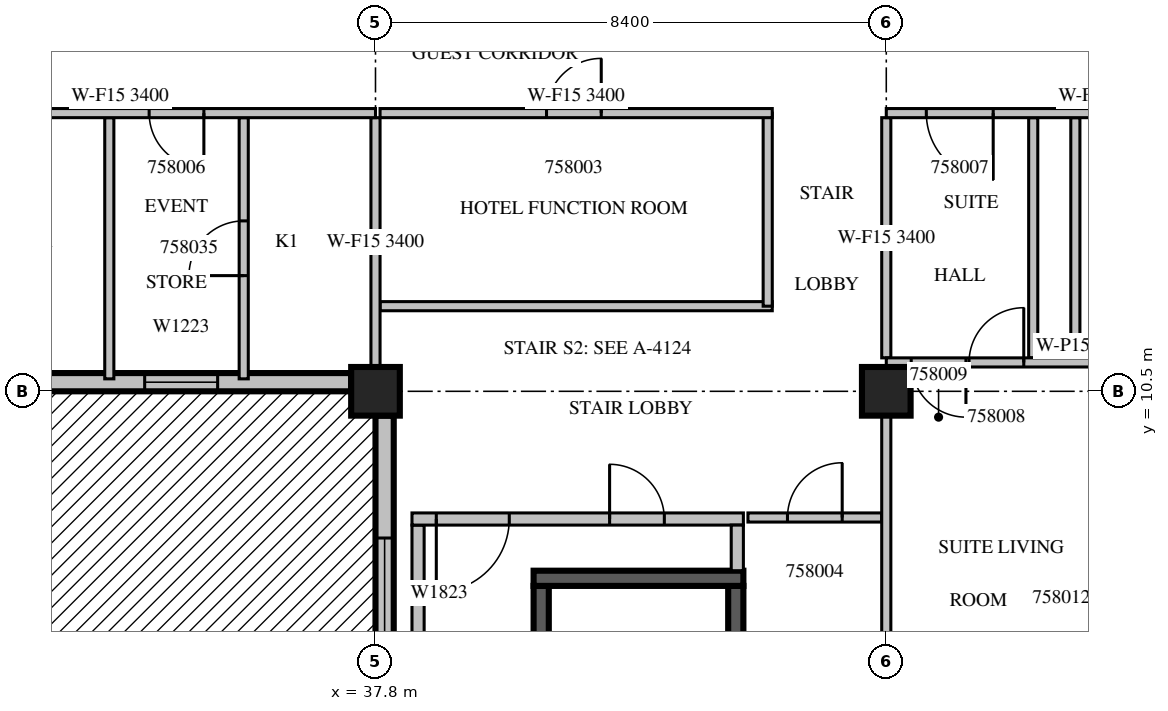
"""IFC4 building model, lengths in metres.
Left out: names, types, materials, properties, quantities, classifications, styles, units other than length and angle.
Written with IfcOpenShell. Run it as: python <this file> out.ifc"""

import sys

from ifc_helpers import new_model, si_unit, direction, frame, frame_2d, origin, origin_2d, place, context, subcontext, project, spatial, rectangle, extrude, source, transform, mapped, element, fill, save


model = new_model("IFC4")
c1 = context("Model", 3, precision=1e-05, world=origin(), true_north=direction((0.0, 1.0)))
c2 = subcontext(c1, "Body", "Model", "MODEL_VIEW")
j1 = project(units=[si_unit("LENGTHUNIT", "METRE"), si_unit("PLANEANGLEUNIT", "RADIAN")], contexts=[c1])
p1 = place(None, origin())
s1 = spatial("IfcSite", under=j1, at=p1, CompositionType="ELEMENT")
p2 = place(p1, origin())
s2 = spatial("IfcBuilding", under=s1, at=p2, CompositionType="ELEMENT")
p3 = place(p2, frame((0.0, 0.0, 253.8)))
s3 = spatial("IfcBuildingStorey", under=s2, at=p3, CompositionType="ELEMENT", Elevation=253.8)
m1 = source(origin(), c2, "Body", "SweptSolid", [
    extrude(rectangle(XDim=0.8, YDim=0.8, at=origin_2d()), origin(), (0.0, 0.0, 1.0), 3.8),
])
for number, where, z_axis, x_axis in (
    (1, (37.8, 10.5, 0.0), (0.0, 0.0, 1.0), (1.0, 0.0, 0.0)),
    (2, (46.2, 10.5, 0.0), (0.0, 0.0, 1.0), (1.0, 0.0, 0.0)),
):
    element("IfcColumn", number, at=place(p3, frame(where, z_axis=z_axis, x_axis=x_axis)), inside=s3, PredefinedType="COLUMN", context=c2, shape_type="MappedRepresentation", body=[
        mapped(m1, transform((0.0, 0.0, 0.0), scale=1.0)),
    ])
m2 = source(origin(), c2, "Body", "SweptSolid", [
    extrude(rectangle(XDim=7.6, YDim=0.3, at=frame_2d((3.8, 0.0))), origin(), (0.0, 0.0, 1.0), 3.4),
])
p4 = place(p3, frame((29.8, 10.65, 0.0), z_axis=(0.0, 0.0, 1.0), x_axis=(1.0, 0.0, 0.0)))
e3 = element("IfcWall", 3, at=p4, inside=s3, PredefinedType="STANDARD", context=c2, shape_type="MappedRepresentation", body=[
    mapped(m2, transform((0.0, 0.0, 0.0), scale=1.0)),
])
m3 = source(origin(), c2, "Body", "SweptSolid", [
    extrude(rectangle(XDim=1.8, YDim=2.4, at=frame_2d((0.9, 1.2))), frame((0.0, 0.16, 0.0), z_axis=(0.0, -1.0, 0.0), x_axis=(1.0, 0.0, 0.0)), (0.0, 0.0, 1.0), 0.32),
])
p5 = place(p4, frame((0.8, 0.0, 0.0)))
e4 = element("IfcOpeningElement", 4, at=p5, cuts=e3, PredefinedType="OPENING", context=c2, shape_type="MappedRepresentation", body=[
    mapped(m3, transform((0.0, 0.0, 0.0), scale=1.0)),
])
m4 = source(origin(), c2, "Body", "SweptSolid", [
    extrude(rectangle(XDim=1.2, YDim=2.3, at=frame_2d((0.6, 1.15))), frame((0.0, 0.16, 0.0), z_axis=(0.0, -1.0, 0.0), x_axis=(1.0, 0.0, 0.0)), (0.0, 0.0, 1.0), 0.32),
])
p6 = place(p4, frame((4.204, 0.0, 0.6)))
e5 = element("IfcOpeningElement", 5, at=p6, cuts=e3, PredefinedType="OPENING", context=c2, shape_type="MappedRepresentation", body=[
    mapped(m4, transform((0.0, 0.0, 0.0), scale=1.0)),
])
m5 = source(origin(), c2, "Body", "SweptSolid", [
    extrude(rectangle(XDim=9.3, YDim=0.3, at=frame_2d((4.65, 0.0))), origin(), (0.0, 0.0, 1.0), 3.4),
])
p7 = place(p3, frame((37.95, 10.1, 0.0), z_axis=(0.0, 0.0, 1.0), x_axis=(0.0, -1.0, 0.0)))
e6 = element("IfcWall", 6, at=p7, inside=s3, PredefinedType="STANDARD", context=c2, shape_type="MappedRepresentation", body=[
    mapped(m5, transform((0.0, 0.0, 0.0), scale=1.0)),
])
m6 = source(origin(), c2, "Body", "SweptSolid", [
    extrude(rectangle(XDim=1.8, YDim=2.3, at=frame_2d((0.9, 1.15))), frame((0.0, 0.16, 0.0), z_axis=(0.0, -1.0, 0.0), x_axis=(1.0, 0.0, 0.0)), (0.0, 0.0, 1.0), 0.32),
])
p8 = place(p7, frame((2.013, 0.0, 0.6)))
e7 = element("IfcOpeningElement", 7, at=p8, cuts=e6, PredefinedType="OPENING", context=c2, shape_type="MappedRepresentation", body=[
    mapped(m6, transform((0.0, 0.0, 0.0), scale=1.0)),
])
m7 = source(origin(), c2, "Body", "SweptSolid", [
    extrude(rectangle(XDim=3.0, YDim=2.3, at=frame_2d((1.5, 1.15))), frame((0.0, 0.16, 0.0), z_axis=(0.0, -1.0, 0.0), x_axis=(1.0, 0.0, 0.0)), (0.0, 0.0, 1.0), 0.32),
])
p9 = place(p7, frame((5.975, 0.0, 0.6)))
e8 = element("IfcOpeningElement", 8, at=p9, cuts=e6, PredefinedType="OPENING", context=c2, shape_type="MappedRepresentation", body=[
    mapped(m7, transform((0.0, 0.0, 0.0), scale=1.0)),
])
m8 = source(origin(), c2, "Body", "SweptSolid", [
    extrude(rectangle(XDim=7.0, YDim=0.25, at=frame_2d((3.5, 0.0))), origin(), (0.0, 0.0, 1.0), 3.4),
])
p10 = place(p3, frame((40.525, 0.3, 0.0), z_axis=(0.0, 0.0, 1.0), x_axis=(0.0, 1.0, 0.0)))
e9 = element("IfcWall", 9, at=p10, inside=s3, PredefinedType="SOLIDWALL", context=c2, shape_type="MappedRepresentation", body=[
    mapped(m8, transform((0.0, 0.0, 0.0), scale=1.0)),
])
m9 = source(origin(), c2, "Body", "SweptSolid", [
    extrude(rectangle(XDim=1.1, YDim=2.1, at=frame_2d((0.55, 1.05))), frame((0.0, 0.135, 0.0), z_axis=(0.0, -1.0, 0.0), x_axis=(1.0, 0.0, 0.0)), (0.0, 0.0, 1.0), 0.27),
])
p11 = place(p10, frame((0.55, 0.0, 0.0)))
e10 = element("IfcOpeningElement", 10, at=p11, cuts=e9, PredefinedType="OPENING", context=c2, shape_type="MappedRepresentation", body=[
    mapped(m9, transform((0.0, 0.0, 0.0), scale=1.0)),
])
p12 = place(p3, frame((43.725, 0.3, 0.0), z_axis=(0.0, 0.0, 1.0), x_axis=(0.0, 1.0, 0.0)))
e11 = element("IfcWall", 11, at=p12, inside=s3, PredefinedType="SOLIDWALL", context=c2, shape_type="MappedRepresentation", body=[
    mapped(m8, transform((0.0, 0.0, 0.0), scale=1.0)),
])
m10 = source(origin(), c2, "Body", "SweptSolid", [
    extrude(rectangle(XDim=3.45, YDim=0.25, at=frame_2d((1.725, 0.0))), origin(), (0.0, 0.0, 1.0), 3.4),
])
p13 = place(p3, frame((40.4, 7.425, 0.0), z_axis=(0.0, 0.0, 1.0), x_axis=(1.0, 0.0, 0.0)))
e12 = element("IfcWall", 12, at=p13, inside=s3, PredefinedType="SOLIDWALL", context=c2, shape_type="MappedRepresentation", body=[
    mapped(m10, transform((0.0, 0.0, 0.0), scale=1.0)),
])
m11 = source(origin(), c2, "Body", "SweptSolid", [
    extrude(rectangle(XDim=8.0, YDim=0.2, at=frame_2d((4.0, 0.0))), origin(), (0.0, 0.0, 1.0), 3.4),
])
p14 = place(p3, frame((38.5, 0.3, 0.0), z_axis=(0.0, 0.0, 1.0), x_axis=(0.0, 1.0, 0.0)))
e13 = element("IfcWall", 13, at=p14, inside=s3, PredefinedType="PARTITIONING", context=c2, shape_type="MappedRepresentation", body=[
    mapped(m11, transform((0.0, 0.0, 0.0), scale=1.0)),
])
m12 = source(origin(), c2, "Body", "SweptSolid", [
    extrude(rectangle(XDim=5.45, YDim=0.2, at=frame_2d((2.725, 0.0))), origin(), (0.0, 0.0, 1.0), 3.4),
])
p15 = place(p3, frame((38.4, 8.4, 0.0), z_axis=(0.0, 0.0, 1.0), x_axis=(1.0, 0.0, 0.0)))
e14 = element("IfcWall", 14, at=p15, inside=s3, PredefinedType="PARTITIONING", context=c2, shape_type="MappedRepresentation", body=[
    mapped(m12, transform((0.0, 0.0, 0.0), scale=1.0)),
])
m13 = source(origin(), c2, "Body", "SweptSolid", [
    extrude(rectangle(XDim=1.2, YDim=2.1, at=frame_2d((0.6, 1.05))), frame((0.0, 0.11, 0.0), z_axis=(0.0, -1.0, 0.0), x_axis=(1.0, 0.0, 0.0)), (0.0, 0.0, 1.0), 0.22),
])
p16 = place(p15, frame((0.4, 0.0, 0.0)))
e15 = element("IfcOpeningElement", 15, at=p16, cuts=e14, PredefinedType="OPENING", context=c2, shape_type="MappedRepresentation", body=[
    mapped(m13, transform((0.0, 0.0, 0.0), scale=1.0)),
])
m14 = source(origin(), c2, "Body", "SweptSolid", [
    extrude(rectangle(XDim=0.9, YDim=2.1, at=frame_2d((0.45, 1.05))), frame((0.0, 0.11, 0.0), z_axis=(0.0, -1.0, 0.0), x_axis=(1.0, 0.0, 0.0)), (0.0, 0.0, 1.0), 0.22),
])
p17 = place(p15, frame((3.25, 0.0, 0.0)))
e16 = element("IfcOpeningElement", 16, at=p17, cuts=e14, PredefinedType="OPENING", context=c2, shape_type="MappedRepresentation", body=[
    mapped(m14, transform((0.0, 0.0, 0.0), scale=1.0)),
])
m15 = source(origin(), c2, "Body", "SweptSolid", [
    extrude(rectangle(XDim=0.75, YDim=0.2, at=frame_2d((0.375, 0.0))), origin(), (0.0, 0.0, 1.0), 3.4),
])
p18 = place(p3, frame((43.75, 7.55, 0.0), z_axis=(0.0, 0.0, 1.0), x_axis=(0.0, 1.0, 0.0)))
e17 = element("IfcWall", 17, at=p18, inside=s3, PredefinedType="PARTITIONING", context=c2, shape_type="MappedRepresentation", body=[
    mapped(m15, transform((0.0, 0.0, 0.0), scale=1.0)),
])
m16 = source(origin(), c2, "Body", "SweptSolid", [
    extrude(rectangle(XDim=6.45, YDim=0.15, at=frame_2d((3.225, 0.0))), origin(), (0.0, 0.0, 1.0), 3.4),
])
p19 = place(p3, frame((37.875, 11.9, 0.0), z_axis=(0.0, 0.0, 1.0), x_axis=(1.0, 0.0, 0.0)))
e18 = element("IfcWall", 18, at=p19, inside=s3, PredefinedType="PARTITIONING", context=c2, shape_type="MappedRepresentation", body=[
    mapped(m16, transform((0.0, 0.0, 0.0), scale=1.0)),
])
m17 = source(origin(), c2, "Body", "SweptSolid", [
    extrude(rectangle(XDim=3.175, YDim=0.15, at=frame_2d((1.587, 0.0))), origin(), (0.0, 0.0, 1.0), 3.4),
])
p20 = place(p3, frame((44.25, 11.9, 0.0), z_axis=(0.0, 0.0, 1.0), x_axis=(0.0, 1.0, 0.0)))
e19 = element("IfcWall", 19, at=p20, inside=s3, PredefinedType="PARTITIONING", context=c2, shape_type="MappedRepresentation", body=[
    mapped(m17, transform((0.0, 0.0, 0.0), scale=1.0)),
])
p21 = place(p3, frame((44.325, 15.075, 0.0), z_axis=(0.0, 0.0, 1.0), x_axis=(-1.0, 0.0, 0.0)))
e20 = element("IfcWall", 20, at=p21, inside=s3, PredefinedType="PARTITIONING", context=c2, shape_type="MappedRepresentation", body=[
    mapped(m16, transform((0.0, 0.0, 0.0), scale=1.0)),
])
m18 = source(origin(), c2, "Body", "SweptSolid", [
    extrude(rectangle(XDim=0.9, YDim=2.1, at=frame_2d((0.45, 1.05))), frame((0.0, 0.085, 0.0), z_axis=(0.0, -1.0, 0.0), x_axis=(1.0, 0.0, 0.0)), (0.0, 0.0, 1.0), 0.17),
])
p22 = place(p21, frame((2.812, 0.0, 0.0)))
e21 = element("IfcOpeningElement", 21, at=p22, cuts=e20, PredefinedType="OPENING", context=c2, shape_type="MappedRepresentation", body=[
    mapped(m18, transform((0.0, 0.0, 0.0), scale=1.0)),
])
m19 = source(origin(), c2, "Body", "SweptSolid", [
    extrude(rectangle(XDim=2.2, YDim=0.15, at=frame_2d((1.1, 0.0))), origin(), (0.0, 0.0, 1.0), 3.4),
])
p23 = place(p3, frame((46.125, 8.425, 0.0), z_axis=(0.0, 0.0, 1.0), x_axis=(-1.0, 0.0, 0.0)))
e22 = element("IfcWall", 22, at=p23, inside=s3, PredefinedType="PARTITIONING", context=c2, shape_type="MappedRepresentation", body=[
    mapped(m19, transform((0.0, 0.0, 0.0), scale=1.0)),
])
p24 = place(p23, frame((0.65, 0.0, 0.0)))
e23 = element("IfcOpeningElement", 23, at=p24, cuts=e22, PredefinedType="OPENING", context=c2, shape_type="MappedRepresentation", body=[
    mapped(m18, transform((0.0, 0.0, 0.0), scale=1.0)),
])
m20 = source(origin(), c2, "Body", "SweptSolid", [
    extrude(rectangle(XDim=4.295, YDim=0.15, at=frame_2d((2.147, 0.0))), origin(), (0.0, 0.0, 1.0), 3.4),
])
p25 = place(p3, frame((33.422, 10.705, 0.0), z_axis=(0.0, 0.0, 1.0), x_axis=(0.0, 1.0, 0.0)))
e24 = element("IfcWall", 24, at=p25, inside=s3, PredefinedType="PARTITIONING", context=c2, shape_type="MappedRepresentation", body=[
    mapped(m20, transform((0.0, 0.0, 0.0), scale=1.0)),
])
p26 = place(p3, frame((35.633, 10.705, 0.0), z_axis=(0.0, 0.0, 1.0), x_axis=(0.0, 1.0, 0.0)))
e25 = element("IfcWall", 25, at=p26, inside=s3, PredefinedType="PARTITIONING", context=c2, shape_type="MappedRepresentation", body=[
    mapped(m20, transform((0.0, 0.0, 0.0), scale=1.0)),
])
p27 = place(p26, frame((1.698, 0.0, 0.0)))
e26 = element("IfcOpeningElement", 26, at=p27, cuts=e25, PredefinedType="OPENING", context=c2, shape_type="MappedRepresentation", body=[
    mapped(m18, transform((0.0, 0.0, 0.0), scale=1.0)),
])
m21 = source(origin(), c2, "Body", "SweptSolid", [
    extrude(rectangle(XDim=4.101, YDim=0.15, at=frame_2d((2.05, 0.0))), origin(), (0.0, 0.0, 1.0), 3.4),
])
p28 = place(p3, frame((37.8, 10.899, 0.0), z_axis=(0.0, 0.0, 1.0), x_axis=(0.0, 1.0, 0.0)))
e27 = element("IfcWall", 27, at=p28, inside=s3, PredefinedType="PARTITIONING", context=c2, shape_type="MappedRepresentation", body=[
    mapped(m21, transform((0.0, 0.0, 0.0), scale=1.0)),
])
m22 = source(origin(), c2, "Body", "SweptSolid", [
    extrude(rectangle(XDim=3.95, YDim=0.15, at=frame_2d((1.975, 0.0))), origin(), (0.0, 0.0, 1.0), 3.4),
])
for number, where, z_axis, x_axis in (
    (28, (48.617, 11.05, 0.0), (0.0, 0.0, 1.0), (0.0, 1.0, 0.0)),
    (29, (49.309, 11.05, 0.0), (0.0, 0.0, 1.0), (0.0, 1.0, 0.0)),
):
    element("IfcWall", number, at=place(p3, frame(where, z_axis=z_axis, x_axis=x_axis)), inside=s3, PredefinedType="PARTITIONING", context=c2, shape_type="MappedRepresentation", body=[
        mapped(m22, transform((0.0, 0.0, 0.0), scale=1.0)),
    ])
m23 = source(origin(), c2, "Body", "SweptSolid", [
    extrude(rectangle(XDim=9.302, YDim=0.15, at=frame_2d((4.651, 0.0))), origin(), (0.0, 0.0, 1.0), 3.4),
])
p29 = place(p3, frame((46.2, 0.799, 0.0), z_axis=(0.0, 0.0, 1.0), x_axis=(0.0, 1.0, 0.0)))
e30 = element("IfcWall", 30, at=p29, inside=s3, PredefinedType="PARTITIONING", context=c2, shape_type="MappedRepresentation", body=[
    mapped(m23, transform((0.0, 0.0, 0.0), scale=1.0)),
])
p30 = place(p3, frame((46.2, 11.05, 0.0), z_axis=(0.0, 0.0, 1.0), x_axis=(0.0, 1.0, 0.0)))
e31 = element("IfcWall", 31, at=p30, inside=s3, PredefinedType="PARTITIONING", context=c2, shape_type="MappedRepresentation", body=[
    mapped(m22, transform((0.0, 0.0, 0.0), scale=1.0)),
])
m24 = source(origin(), c2, "Body", "SweptSolid", [
    extrude(rectangle(XDim=7.26, YDim=0.15, at=frame_2d((3.63, 0.0))), origin(), (0.0, 0.0, 1.0), 3.4),
])
p31 = place(p3, frame((53.46, 10.975, 0.0), z_axis=(0.0, 0.0, 1.0), x_axis=(-1.0, 0.0, 0.0)))
e32 = element("IfcWall", 32, at=p31, inside=s3, PredefinedType="PARTITIONING", context=c2, shape_type="MappedRepresentation", body=[
    mapped(m24, transform((0.0, 0.0, 0.0), scale=1.0)),
])
p32 = place(p31, frame((4.999, 0.0, 0.0)))
e33 = element("IfcOpeningElement", 33, at=p32, cuts=e32, PredefinedType="OPENING", context=c2, shape_type="MappedRepresentation", body=[
    mapped(m18, transform((0.0, 0.0, 0.0), scale=1.0)),
])
p33 = place(p31, frame((5.95, 0.0, 0.0)))
e34 = element("IfcOpeningElement", 34, at=p33, cuts=e32, PredefinedType="OPENING", context=c2, shape_type="MappedRepresentation", body=[
    mapped(m18, transform((0.0, 0.0, 0.0), scale=1.0)),
])
p34 = place(p31, frame((2.264, 0.0, 0.0)))
e35 = element("IfcOpeningElement", 35, at=p34, cuts=e32, PredefinedType="OPENING", context=c2, shape_type="MappedRepresentation", body=[
    mapped(m18, transform((0.0, 0.0, 0.0), scale=1.0)),
])
m25 = source(origin(), c2, "Body", "SweptSolid", [
    extrude(rectangle(XDim=8.4, YDim=0.15, at=frame_2d((4.2, 0.0))), origin(), (0.0, 0.0, 1.0), 3.4),
])
p35 = place(p3, frame((37.8, 15.075, 0.0), z_axis=(0.0, 0.0, 1.0), x_axis=(-1.0, 0.0, 0.0)))
e36 = element("IfcWall", 36, at=p35, inside=s3, PredefinedType="PARTITIONING", context=c2, shape_type="MappedRepresentation", body=[
    mapped(m25, transform((0.0, 0.0, 0.0), scale=1.0)),
])
m26 = source(origin(), c2, "Body", "SweptSolid", [
    extrude(rectangle(XDim=1.6, YDim=2.1, at=frame_2d((0.8, 1.05))), frame((0.0, 0.085, 0.0), z_axis=(0.0, -1.0, 0.0), x_axis=(1.0, 0.0, 0.0)), (0.0, 0.0, 1.0), 0.17),
])
p36 = place(p35, frame((5.589, 0.0, 0.0)))
e37 = element("IfcOpeningElement", 37, at=p36, cuts=e36, PredefinedType="OPENING", context=c2, shape_type="MappedRepresentation", body=[
    mapped(m26, transform((0.0, 0.0, 0.0), scale=1.0)),
])
p37 = place(p35, frame((2.822, 0.0, 0.0)))
e38 = element("IfcOpeningElement", 38, at=p37, cuts=e36, PredefinedType="OPENING", context=c2, shape_type="MappedRepresentation", body=[
    mapped(m18, transform((0.0, 0.0, 0.0), scale=1.0)),
])
p38 = place(p3, frame((53.46, 15.075, 0.0), z_axis=(0.0, 0.0, 1.0), x_axis=(-1.0, 0.0, 0.0)))
e39 = element("IfcWall", 39, at=p38, inside=s3, PredefinedType="PARTITIONING", context=c2, shape_type="MappedRepresentation", body=[
    mapped(m24, transform((0.0, 0.0, 0.0), scale=1.0)),
])
m27 = source(origin(), c2, "Body", "SweptSolid", [
    extrude(rectangle(XDim=1.1, YDim=2.1, at=frame_2d((0.55, 1.05))), frame((0.0, 0.085, 0.0), z_axis=(0.0, -1.0, 0.0), x_axis=(1.0, 0.0, 0.0)), (0.0, 0.0, 1.0), 0.17),
])
p39 = place(p38, frame((5.502, 0.0, 0.0)))
e40 = element("IfcOpeningElement", 40, at=p39, cuts=e39, PredefinedType="OPENING", context=c2, shape_type="MappedRepresentation", body=[
    mapped(m27, transform((0.0, 0.0, 0.0), scale=1.0)),
])
p40 = place(p38, frame((0.536, 0.0, 0.0)))
e41 = element("IfcOpeningElement", 41, at=p40, cuts=e39, PredefinedType="OPENING", context=c2, shape_type="MappedRepresentation", body=[
    mapped(m18, transform((0.0, 0.0, 0.0), scale=1.0)),
])
m28 = source(origin(), c2, "Body", "SweptSolid", [
    extrude(rectangle(XDim=1.2, YDim=2.3, at=frame_2d((0.6, 1.15))), frame((0.0, 0.03, 0.0), z_axis=(0.0, -1.0, 0.0), x_axis=(1.0, 0.0, 0.0)), (0.0, 0.0, 1.0), 0.06),
])
p41 = place(p6, origin())
e42 = element("IfcWindow", 42, at=p41, inside=s3, PartitioningType="SINGLE_PANEL", PredefinedType="WINDOW", context=c2, shape_type="MappedRepresentation", body=[
    mapped(m28, transform((0.0, 0.0, 0.0), scale=1.0)),
])
fill(e5, e42)
m29 = source(origin(), c2, "Body", "SweptSolid", [
    extrude(rectangle(XDim=1.8, YDim=2.3, at=frame_2d((0.9, 1.15))), frame((0.0, 0.03, 0.0), z_axis=(0.0, -1.0, 0.0), x_axis=(1.0, 0.0, 0.0)), (0.0, 0.0, 1.0), 0.06),
])
p42 = place(p8, origin())
e43 = element("IfcWindow", 43, at=p42, inside=s3, PartitioningType="SINGLE_PANEL", PredefinedType="WINDOW", context=c2, shape_type="MappedRepresentation", body=[
    mapped(m29, transform((0.0, 0.0, 0.0), scale=1.0)),
])
fill(e7, e43)
m30 = source(origin(), c2, "Body", "SweptSolid", [
    extrude(rectangle(XDim=1.2, YDim=2.1, at=frame_2d((0.6, 1.05))), frame((0.0, 0.025, 0.0), z_axis=(0.0, -1.0, 0.0), x_axis=(1.0, 0.0, 0.0)), (0.0, 0.0, 1.0), 0.05),
])
p43 = place(p16, origin())
e44 = element("IfcDoor", 44, at=p43, inside=s3, OperationType="SINGLE_SWING_RIGHT", PredefinedType="DOOR", context=c2, shape_type="MappedRepresentation", body=[
    mapped(m30, transform((0.0, 0.0, 0.0), scale=1.0)),
])
fill(e15, e44)
m31 = source(origin(), c2, "Body", "SweptSolid", [
    extrude(rectangle(XDim=0.9, YDim=2.1, at=frame_2d((0.45, 1.05))), frame((0.0, 0.025, 0.0), z_axis=(0.0, -1.0, 0.0), x_axis=(1.0, 0.0, 0.0)), (0.0, 0.0, 1.0), 0.05),
])
p44 = place(p17, origin())
e45 = element("IfcDoor", 45, at=p44, inside=s3, OperationType="SINGLE_SWING_LEFT", PredefinedType="DOOR", context=c2, shape_type="MappedRepresentation", body=[
    mapped(m31, transform((0.0, 0.0, 0.0), scale=1.0)),
])
fill(e16, e45)
p45 = place(p22, origin())
e46 = element("IfcDoor", 46, at=p45, inside=s3, OperationType="SINGLE_SWING_RIGHT", PredefinedType="DOOR", context=c2, shape_type="MappedRepresentation", body=[
    mapped(m31, transform((0.0, 0.0, 0.0), scale=1.0)),
])
fill(e21, e46)
p46 = place(p24, origin())
e47 = element("IfcDoor", 47, at=p46, inside=s3, OperationType="SINGLE_SWING_RIGHT", PredefinedType="DOOR", context=c2, shape_type="MappedRepresentation", body=[
    mapped(m31, transform((0.0, 0.0, 0.0), scale=1.0)),
])
fill(e23, e47)
p47 = place(p37, origin())
e48 = element("IfcDoor", 48, at=p47, inside=s3, OperationType="SINGLE_SWING_LEFT", PredefinedType="DOOR", context=c2, shape_type="MappedRepresentation", body=[
    mapped(m31, transform((0.0, 0.0, 0.0), scale=1.0)),
])
fill(e38, e48)
m32 = source(origin(), c2, "Body", "SweptSolid", [
    extrude(rectangle(XDim=1.1, YDim=2.1, at=frame_2d((0.55, 1.05))), frame((0.0, 0.025, 0.0), z_axis=(0.0, -1.0, 0.0), x_axis=(1.0, 0.0, 0.0)), (0.0, 0.0, 1.0), 0.05),
])
p48 = place(p39, origin())
e49 = element("IfcDoor", 49, at=p48, inside=s3, OperationType="SINGLE_SWING_LEFT", PredefinedType="DOOR", context=c2, shape_type="MappedRepresentation", body=[
    mapped(m32, transform((0.0, 0.0, 0.0), scale=1.0)),
])
fill(e40, e49)
p49 = place(p32, origin())
e50 = element("IfcDoor", 50, at=p49, inside=s3, OperationType="SINGLE_SWING_RIGHT", PredefinedType="DOOR", context=c2, shape_type="MappedRepresentation", body=[
    mapped(m31, transform((0.0, 0.0, 0.0), scale=1.0)),
])
fill(e33, e50)
p50 = place(p33, origin())
e51 = element("IfcDoor", 51, at=p50, inside=s3, OperationType="SINGLE_SWING_LEFT", PredefinedType="DOOR", context=c2, shape_type="MappedRepresentation", body=[
    mapped(m31, transform((0.0, 0.0, 0.0), scale=1.0)),
])
fill(e34, e51)
p51 = place(p27, origin())
e52 = element("IfcDoor", 52, at=p51, inside=s3, OperationType="SINGLE_SWING_LEFT", PredefinedType="DOOR", context=c2, shape_type="MappedRepresentation", body=[
    mapped(m31, transform((0.0, 0.0, 0.0), scale=1.0)),
])
fill(e26, e52)
save(model, sys.argv[1])
